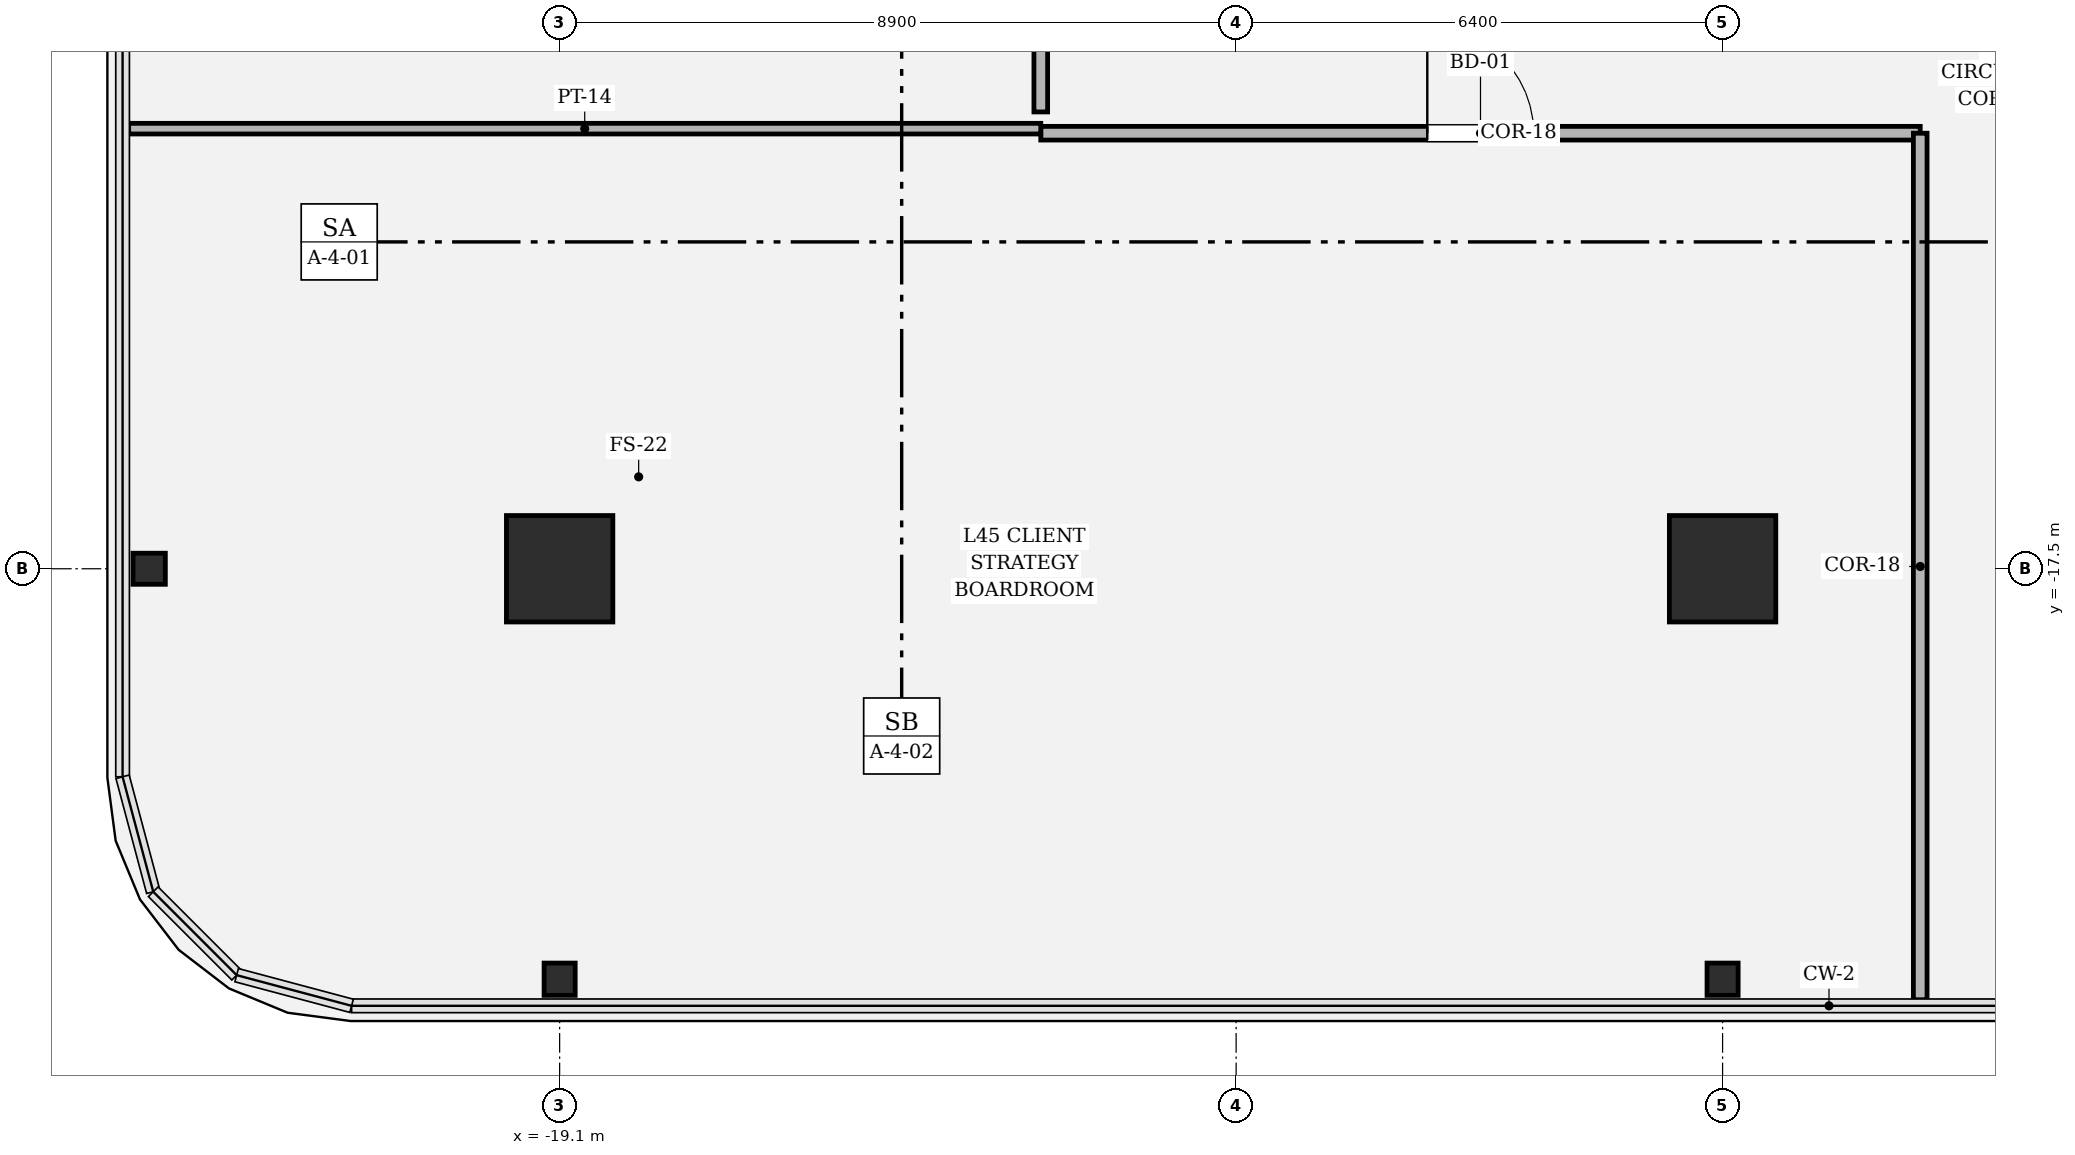
"""IFC4 building model, lengths in metres.
Left out: names, types, materials, properties, quantities, classifications, styles, units other than length and angle.
Written with IfcOpenShell. Run it as: python <this file> out.ifc"""

import sys

from ifc_helpers import new_model, si_unit, direction, frame, frame_2d, origin, origin_2d, place, context, subcontext, project, spatial, rectangle, hollow_rectangle, i_section, extrude, element, fill, save


model = new_model("IFC4")
c1 = context("Model", 3, precision=1e-05, world=origin(), true_north=direction((0.0, 1.0)))
c2 = subcontext(c1, "Body", "Model", "MODEL_VIEW")
j1 = project(units=[si_unit("LENGTHUNIT", "METRE"), si_unit("PLANEANGLEUNIT", "RADIAN")], contexts=[c1])
p1 = place(None, origin())
s1 = spatial("IfcSite", under=j1, at=p1, CompositionType="ELEMENT")
p2 = place(p1, origin())
s2 = spatial("IfcBuilding", under=s1, at=p2, CompositionType="ELEMENT")
p3 = place(p2, frame((0.0, 0.0, 192.45)))
s3 = spatial("IfcBuildingStorey", under=s2, at=p3, CompositionType="ELEMENT", Elevation=192.45)
for number, where, z_axis, x_axis in (
    (1, (-19.1, -17.5, 0.0), (0.0, 0.0, 1.0), (1.0, 0.0, 0.0)),
    (2, (-3.8, -17.5, 0.0), (0.0, 0.0, 1.0), (1.0, 0.0, 0.0)),
):
    element("IfcColumn", number, at=place(p3, frame(where, z_axis=z_axis, x_axis=x_axis)), inside=s3, PredefinedType="COLUMN", context=c2, shape_type="SweptSolid", body=[
        extrude(hollow_rectangle(XDim=1.4, YDim=1.4, WallThickness=0.042, at=origin_2d()), origin(), (0.0, 0.0, 1.0), 4.05),
    ])
for number, where, z_axis, x_axis in (
    (3, (-19.1, -22.9, 0.0), (0.0, 0.0, 1.0), (1.0, 0.0, 0.0)),
    (4, (-3.8, -22.9, 0.0), (0.0, 0.0, 1.0), (1.0, 0.0, 0.0)),
    (5, (-24.5, -17.5, 0.0), (0.0, 0.0, 1.0), (0.0, 1.0, 0.0)),
):
    element("IfcColumn", number, at=place(p3, frame(where, z_axis=z_axis, x_axis=x_axis)), inside=s3, PredefinedType="COLUMN", context=c2, shape_type="SweptSolid", body=[
        extrude(i_section(OverallWidth=0.409, OverallDepth=0.425, WebThickness=0.032, FlangeThickness=0.052, FilletRadius=0.018, at=origin_2d()), origin(), (0.0, 0.0, 1.0), 4.048),
    ])
p4 = place(p3, frame((-12.77, -11.77, 0.0), z_axis=(0.0, 0.0, 1.0), x_axis=(1.0, 0.0, 0.0)))
e6 = element("IfcWall", 6, at=p4, inside=s3, PredefinedType="PARTITIONING", context=c2, shape_type="SweptSolid", body=[
    extrude(rectangle(XDim=11.57, YDim=0.18, at=frame_2d((5.785, 0.0))), origin(), (0.0, 0.0, 1.0), 3.174),
])
p5 = place(p4, frame((5.085, 0.0, 0.0)))
e7 = element("IfcOpeningElement", 7, at=p5, cuts=e6, PredefinedType="OPENING", context=c2, shape_type="SweptSolid", body=[
    extrude(rectangle(XDim=1.4, YDim=2.25, at=frame_2d((0.7, 1.125))), frame((0.0, 0.1, 0.0), z_axis=(0.0, -1.0, 0.0), x_axis=(1.0, 0.0, 0.0)), (0.0, 0.0, 1.0), 0.2),
])
p6 = place(p3, frame((-1.2, -11.77, 0.0), z_axis=(0.0, 0.0, 1.0), x_axis=(0.0, -1.0, 0.0)))
e8 = element("IfcWall", 8, at=p6, inside=s3, PredefinedType="PARTITIONING", context=c2, shape_type="SweptSolid", body=[
    extrude(rectangle(XDim=11.4, YDim=0.18, at=frame_2d((5.7, 0.0))), origin(), (0.0, 0.0, 1.0), 2.544),
])
p7 = place(p3, frame((-24.77, -11.71, 0.0), z_axis=(0.0, 0.0, 1.0), x_axis=(1.0, 0.0, 0.0)))
e9 = element("IfcWall", 9, at=p7, inside=s3, PredefinedType="PARTITIONING", context=c2, shape_type="SweptSolid", body=[
    extrude(rectangle(XDim=12.0, YDim=0.14, at=frame_2d((6.0, 0.0))), origin(), (0.0, 0.0, 1.0), 2.544),
])
p8 = place(p3, frame((-12.77, 8.038, 0.0), z_axis=(0.0, 0.0, 1.0), x_axis=(0.0, -1.0, 0.0)))
e10 = element("IfcWall", 10, at=p8, inside=s3, PredefinedType="PARTITIONING", context=c2, shape_type="SweptSolid", body=[
    extrude(rectangle(XDim=19.528, YDim=0.18, at=frame_2d((9.764, 0.0))), origin(), (0.0, 0.0, 1.0), 3.174),
])
p9 = place(p8, frame((9.239, 0.0, 0.0)))
e11 = element("IfcOpeningElement", 11, at=p9, cuts=e10, PredefinedType="OPENING", context=c2, shape_type="SweptSolid", body=[
    extrude(rectangle(XDim=1.05, YDim=2.2, at=frame_2d((0.525, 1.1))), frame((0.0, 0.1, 0.0), z_axis=(0.0, -1.0, 0.0), x_axis=(1.0, 0.0, 0.0)), (0.0, 0.0, 1.0), 0.2),
])
p10 = place(p5, origin())
e12 = element("IfcDoor", 12, at=p10, inside=s3, OperationType="SINGLE_SWING_LEFT", PredefinedType="DOOR", context=c2, shape_type="SweptSolid", body=[
    extrude(rectangle(XDim=1.4, YDim=2.25, at=frame_2d((0.7, 1.125))), frame((0.0, 0.025, 0.0), z_axis=(0.0, -1.0, 0.0), x_axis=(1.0, 0.0, 0.0)), (0.0, 0.0, 1.0), 0.05),
])
fill(e7, e12)
save(model, sys.argv[1])
